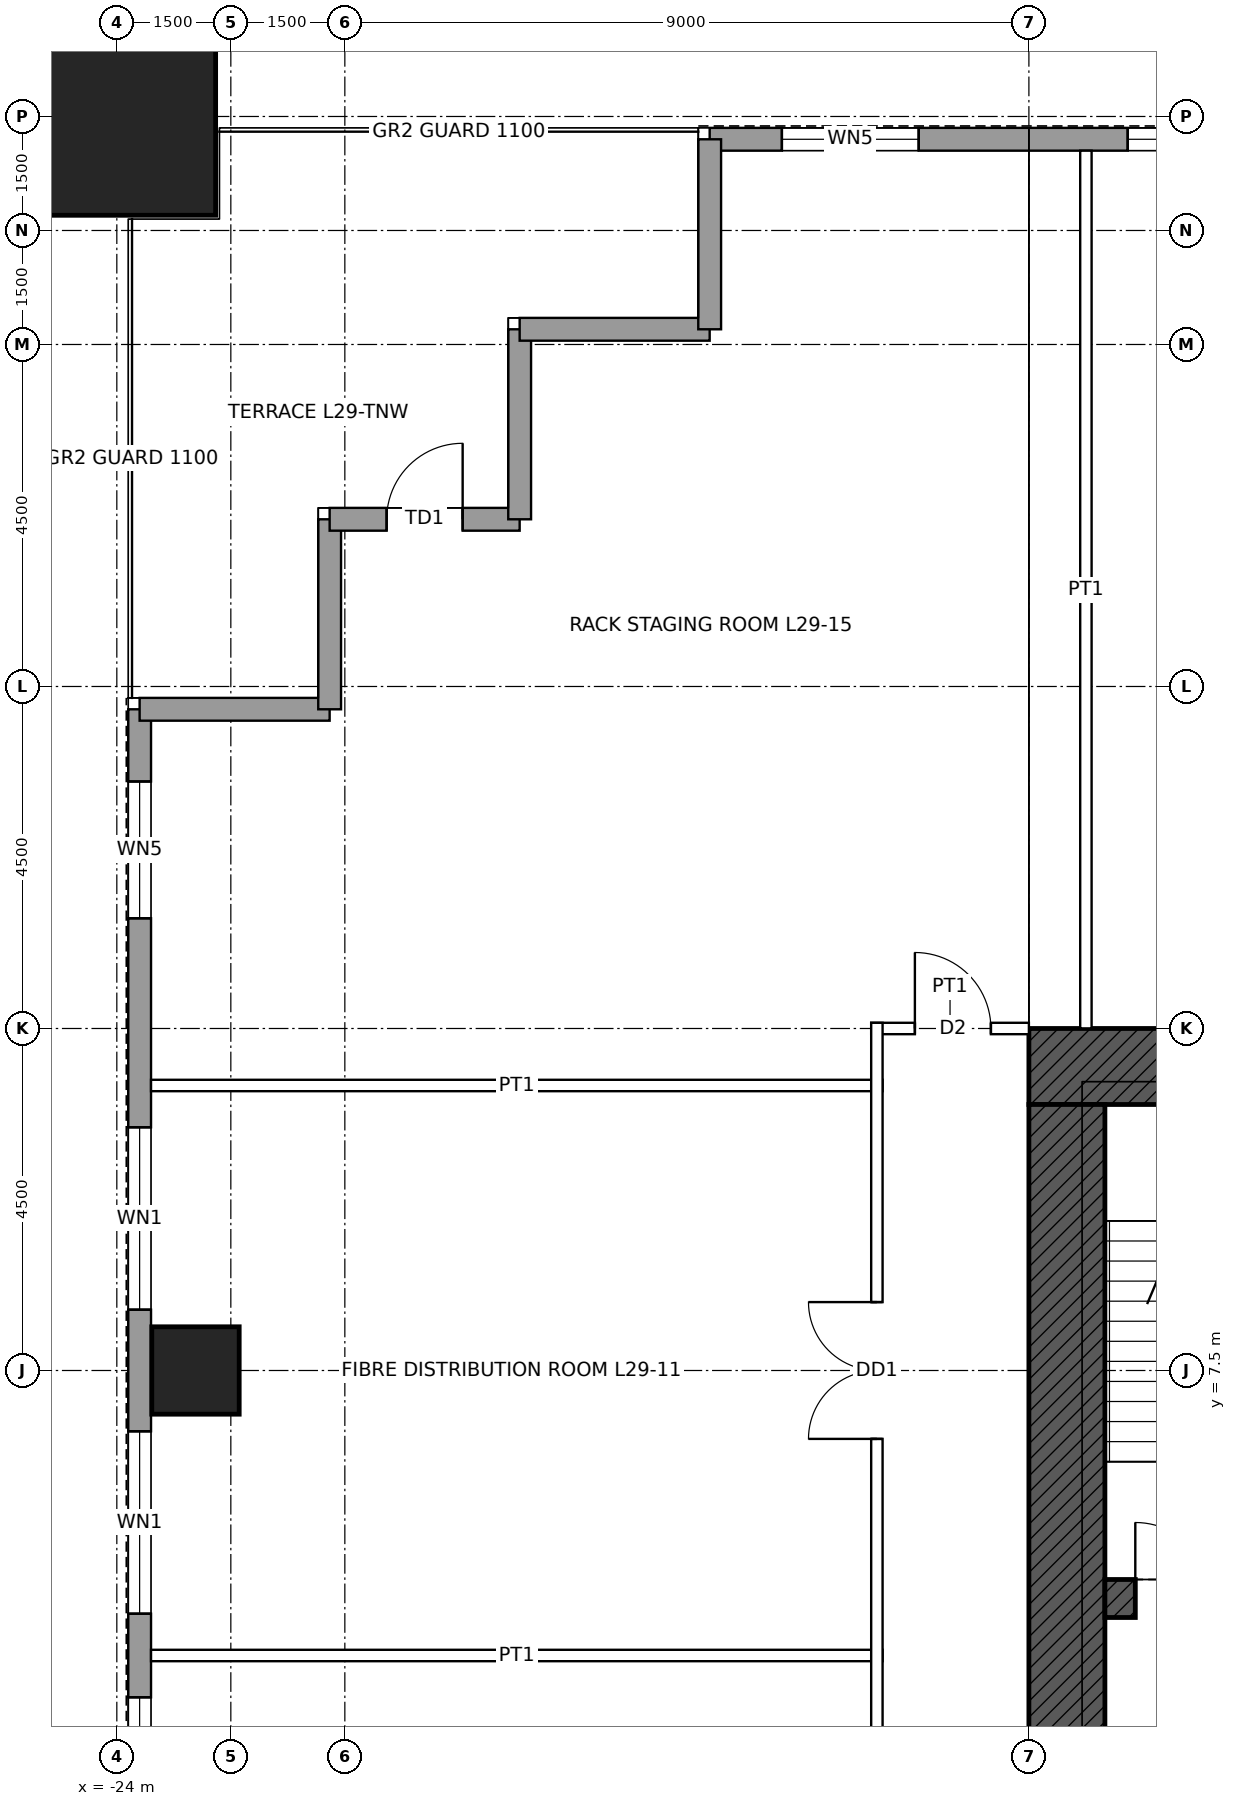
"""IFC4 building model, lengths in metres.
Left out: names, types, materials, properties, quantities, classifications, styles, units other than length and angle.
Written with IfcOpenShell. Run it as: python <this file> out.ifc"""

import sys

from ifc_helpers import new_model, si_unit, direction, frame, frame_2d, origin, origin_2d, place, context, subcontext, project, spatial, rectangle, hollow_rectangle, extrude, element, fill, save


model = new_model("IFC4")
c1 = context("Model", 3, precision=1e-05, world=origin(), true_north=direction((0.0, 1.0)))
c2 = subcontext(c1, "Body", "Model", "MODEL_VIEW")
j1 = project(units=[si_unit("LENGTHUNIT", "METRE"), si_unit("PLANEANGLEUNIT", "RADIAN")], contexts=[c1])
p1 = place(None, origin())
s1 = spatial("IfcSite", under=j1, at=p1, CompositionType="ELEMENT")
p2 = place(p1, origin())
s2 = spatial("IfcBuilding", under=s1, at=p2, CompositionType="ELEMENT")
p3 = place(p2, frame((0.0, 0.0, 144.9)))
s3 = spatial("IfcBuildingStorey", under=s2, at=p3, CompositionType="ELEMENT", Elevation=144.9)
p4 = place(p3, frame((-24.0, 24.0, 0.0), z_axis=(0.0, 0.0, 1.0), x_axis=(1.0, 0.0, 0.0)))
e1 = element("IfcColumn", 1, at=p4, inside=s3, PredefinedType="COLUMN", context=c2, shape_type="SweptSolid", body=[
    extrude(hollow_rectangle(XDim=2.6, YDim=2.6, WallThickness=0.13, at=origin_2d()), origin(), (0.0, 0.0, 1.0), 4.5),
])
p5 = place(p3, frame((-22.965, 7.5, 0.0), z_axis=(0.0, 0.0, 1.0), x_axis=(1.0, 0.0, 0.0)))
e2 = element("IfcColumn", 2, at=p5, inside=s3, PredefinedType="COLUMN", context=c2, shape_type="SweptSolid", body=[
    extrude(hollow_rectangle(XDim=1.15, YDim=1.15, WallThickness=0.075, at=origin_2d()), origin(), (0.0, 0.0, 1.0), 4.5),
])
p6 = place(p3, frame((-12.0, 11.5, 0.0), z_axis=(0.0, 0.0, 1.0), x_axis=(1.0, 0.0, 0.0)))
e3 = element("IfcWall", 3, at=p6, inside=s3, PredefinedType="SHEAR", context=c2, shape_type="SweptSolid", body=[
    extrude(rectangle(XDim=24.0, YDim=1.0, at=frame_2d((12.0, 0.0))), origin(), (0.0, 0.0, 1.0), 4.5),
])
p7 = place(p6, frame((6.25, 0.0, 0.0)))
e4 = element("IfcOpeningElement", 4, at=p7, cuts=e3, PredefinedType="OPENING", context=c2, shape_type="SweptSolid", body=[
    extrude(rectangle(XDim=1.0, YDim=2.4, at=frame_2d((0.5, 1.2))), frame((0.0, 0.51, 0.0), z_axis=(0.0, -1.0, 0.0), x_axis=(1.0, 0.0, 0.0)), (0.0, 0.0, 1.0), 1.02),
])
p8 = place(p6, frame((16.75, 0.0, 0.0)))
e5 = element("IfcOpeningElement", 5, at=p8, cuts=e3, PredefinedType="OPENING", context=c2, shape_type="SweptSolid", body=[
    extrude(rectangle(XDim=1.0, YDim=2.4, at=frame_2d((0.5, 1.2))), frame((0.0, 0.51, 0.0), z_axis=(0.0, -1.0, 0.0), x_axis=(1.0, 0.0, 0.0)), (0.0, 0.0, 1.0), 1.02),
])
p9 = place(p3, frame((-11.5, -11.0, 0.0), z_axis=(0.0, 0.0, 1.0), x_axis=(0.0, 1.0, 0.0)))
e6 = element("IfcWall", 6, at=p9, inside=s3, PredefinedType="SHEAR", context=c2, shape_type="SweptSolid", body=[
    extrude(rectangle(XDim=22.0, YDim=1.0, at=frame_2d((11.0, 0.0))), origin(), (0.0, 0.0, 1.0), 4.5),
])
p10 = place(p9, frame((10.5, 0.0, 0.0)))
e7 = element("IfcOpeningElement", 7, at=p10, cuts=e6, PredefinedType="OPENING", context=c2, shape_type="SweptSolid", body=[
    extrude(rectangle(XDim=1.0, YDim=2.4, at=frame_2d((0.5, 1.2))), frame((0.0, 0.51, 0.0), z_axis=(0.0, -1.0, 0.0), x_axis=(1.0, 0.0, 0.0)), (0.0, 0.0, 1.0), 1.02),
])
p11 = place(p3, frame((-11.0, 4.5, 0.0), z_axis=(0.0, 0.0, 1.0), x_axis=(1.0, 0.0, 0.0)))
e8 = element("IfcWall", 8, at=p11, inside=s3, PredefinedType="SHEAR", context=c2, shape_type="SweptSolid", body=[
    extrude(rectangle(XDim=22.0, YDim=0.5, at=frame_2d((11.0, 0.0))), origin(), (0.0, 0.0, 1.0), 4.5),
])
p12 = place(p11, frame((0.4, 0.0, 0.0)))
e9 = element("IfcOpeningElement", 9, at=p12, cuts=e8, PredefinedType="OPENING", context=c2, shape_type="SweptSolid", body=[
    extrude(rectangle(XDim=1.0, YDim=2.1, at=frame_2d((0.5, 1.05))), frame((0.0, 0.26, 0.0), z_axis=(0.0, -1.0, 0.0), x_axis=(1.0, 0.0, 0.0)), (0.0, 0.0, 1.0), 0.52),
])
p13 = place(p11, frame((20.6, 0.0, 0.0)))
e10 = element("IfcOpeningElement", 10, at=p13, cuts=e8, PredefinedType="OPENING", context=c2, shape_type="SweptSolid", body=[
    extrude(rectangle(XDim=1.0, YDim=2.1, at=frame_2d((0.5, 1.05))), frame((0.0, 0.26, 0.0), z_axis=(0.0, -1.0, 0.0), x_axis=(1.0, 0.0, 0.0)), (0.0, 0.0, 1.0), 0.52),
])
p14 = place(p3, frame((-16.2, 23.7, 0.0), z_axis=(0.0, 0.0, 1.0), x_axis=(1.0, 0.0, 0.0)))
e11 = element("IfcWall", 11, at=p14, inside=s3, PredefinedType="SOLIDWALL", context=c2, shape_type="SweptSolid", body=[
    extrude(rectangle(XDim=32.4, YDim=0.3, at=frame_2d((16.2, 0.0))), origin(), (0.0, 0.0, 1.0), 4.3),
])
p15 = place(p14, frame((0.95, 0.0, 1.0)))
e12 = element("IfcOpeningElement", 12, at=p15, cuts=e11, PredefinedType="OPENING", context=c2, shape_type="SweptSolid", body=[
    extrude(rectangle(XDim=1.8, YDim=1.2, at=frame_2d((0.9, 0.6))), frame((0.0, 0.16, 0.0), z_axis=(0.0, -1.0, 0.0), x_axis=(1.0, 0.0, 0.0)), (0.0, 0.0, 1.0), 0.32),
])
p16 = place(p14, frame((5.5, 0.0, 1.0)))
e13 = element("IfcOpeningElement", 13, at=p16, cuts=e11, PredefinedType="OPENING", context=c2, shape_type="SweptSolid", body=[
    extrude(rectangle(XDim=2.4, YDim=1.2, at=frame_2d((1.2, 0.6))), frame((0.0, 0.16, 0.0), z_axis=(0.0, -1.0, 0.0), x_axis=(1.0, 0.0, 0.0)), (0.0, 0.0, 1.0), 0.32),
])
p17 = place(p14, frame((9.5, 0.0, 1.0)))
e14 = element("IfcOpeningElement", 14, at=p17, cuts=e11, PredefinedType="OPENING", context=c2, shape_type="SweptSolid", body=[
    extrude(rectangle(XDim=2.4, YDim=1.2, at=frame_2d((1.2, 0.6))), frame((0.0, 0.16, 0.0), z_axis=(0.0, -1.0, 0.0), x_axis=(1.0, 0.0, 0.0)), (0.0, 0.0, 1.0), 0.32),
])
p18 = place(p14, frame((13.0, 0.0, 1.0)))
e15 = element("IfcOpeningElement", 15, at=p18, cuts=e11, PredefinedType="OPENING", context=c2, shape_type="SweptSolid", body=[
    extrude(rectangle(XDim=2.4, YDim=1.2, at=frame_2d((1.2, 0.6))), frame((0.0, 0.16, 0.0), z_axis=(0.0, -1.0, 0.0), x_axis=(1.0, 0.0, 0.0)), (0.0, 0.0, 1.0), 0.32),
])
p19 = place(p14, frame((17.0, 0.0, 1.0)))
e16 = element("IfcOpeningElement", 16, at=p19, cuts=e11, PredefinedType="OPENING", context=c2, shape_type="SweptSolid", body=[
    extrude(rectangle(XDim=2.4, YDim=1.2, at=frame_2d((1.2, 0.6))), frame((0.0, 0.16, 0.0), z_axis=(0.0, -1.0, 0.0), x_axis=(1.0, 0.0, 0.0)), (0.0, 0.0, 1.0), 0.32),
])
p20 = place(p14, frame((20.5, 0.0, 1.0)))
e17 = element("IfcOpeningElement", 17, at=p20, cuts=e11, PredefinedType="OPENING", context=c2, shape_type="SweptSolid", body=[
    extrude(rectangle(XDim=2.4, YDim=1.2, at=frame_2d((1.2, 0.6))), frame((0.0, 0.16, 0.0), z_axis=(0.0, -1.0, 0.0), x_axis=(1.0, 0.0, 0.0)), (0.0, 0.0, 1.0), 0.32),
])
p21 = place(p14, frame((24.5, 0.0, 1.0)))
e18 = element("IfcOpeningElement", 18, at=p21, cuts=e11, PredefinedType="OPENING", context=c2, shape_type="SweptSolid", body=[
    extrude(rectangle(XDim=2.4, YDim=1.2, at=frame_2d((1.2, 0.6))), frame((0.0, 0.16, 0.0), z_axis=(0.0, -1.0, 0.0), x_axis=(1.0, 0.0, 0.0)), (0.0, 0.0, 1.0), 0.32),
])
p22 = place(p14, frame((29.65, 0.0, 1.0)))
e19 = element("IfcOpeningElement", 19, at=p22, cuts=e11, PredefinedType="OPENING", context=c2, shape_type="SweptSolid", body=[
    extrude(rectangle(XDim=1.8, YDim=1.2, at=frame_2d((0.9, 0.6))), frame((0.0, 0.16, 0.0), z_axis=(0.0, -1.0, 0.0), x_axis=(1.0, 0.0, 0.0)), (0.0, 0.0, 1.0), 0.32),
])
p23 = place(p3, frame((-23.7, -16.2, 0.0), z_axis=(0.0, 0.0, 1.0), x_axis=(0.0, 1.0, 0.0)))
e20 = element("IfcWall", 20, at=p23, inside=s3, PredefinedType="SOLIDWALL", context=c2, shape_type="SweptSolid", body=[
    extrude(rectangle(XDim=32.4, YDim=0.3, at=frame_2d((16.2, 0.0))), origin(), (0.0, 0.0, 1.0), 4.3),
])
p24 = place(p23, frame((0.95, 0.0, 1.0)))
e21 = element("IfcOpeningElement", 21, at=p24, cuts=e20, PredefinedType="OPENING", context=c2, shape_type="SweptSolid", body=[
    extrude(rectangle(XDim=1.8, YDim=1.2, at=frame_2d((0.9, 0.6))), frame((0.0, 0.16, 0.0), z_axis=(0.0, -1.0, 0.0), x_axis=(1.0, 0.0, 0.0)), (0.0, 0.0, 1.0), 0.32),
])
p25 = place(p23, frame((5.5, 0.0, 1.0)))
e22 = element("IfcOpeningElement", 22, at=p25, cuts=e20, PredefinedType="OPENING", context=c2, shape_type="SweptSolid", body=[
    extrude(rectangle(XDim=2.4, YDim=1.2, at=frame_2d((1.2, 0.6))), frame((0.0, 0.16, 0.0), z_axis=(0.0, -1.0, 0.0), x_axis=(1.0, 0.0, 0.0)), (0.0, 0.0, 1.0), 0.32),
])
p26 = place(p23, frame((9.5, 0.0, 1.0)))
e23 = element("IfcOpeningElement", 23, at=p26, cuts=e20, PredefinedType="OPENING", context=c2, shape_type="SweptSolid", body=[
    extrude(rectangle(XDim=2.4, YDim=1.2, at=frame_2d((1.2, 0.6))), frame((0.0, 0.16, 0.0), z_axis=(0.0, -1.0, 0.0), x_axis=(1.0, 0.0, 0.0)), (0.0, 0.0, 1.0), 0.32),
])
p27 = place(p23, frame((13.0, 0.0, 1.0)))
e24 = element("IfcOpeningElement", 24, at=p27, cuts=e20, PredefinedType="OPENING", context=c2, shape_type="SweptSolid", body=[
    extrude(rectangle(XDim=2.4, YDim=1.2, at=frame_2d((1.2, 0.6))), frame((0.0, 0.16, 0.0), z_axis=(0.0, -1.0, 0.0), x_axis=(1.0, 0.0, 0.0)), (0.0, 0.0, 1.0), 0.32),
])
p28 = place(p23, frame((17.0, 0.0, 1.0)))
e25 = element("IfcOpeningElement", 25, at=p28, cuts=e20, PredefinedType="OPENING", context=c2, shape_type="SweptSolid", body=[
    extrude(rectangle(XDim=2.4, YDim=1.2, at=frame_2d((1.2, 0.6))), frame((0.0, 0.16, 0.0), z_axis=(0.0, -1.0, 0.0), x_axis=(1.0, 0.0, 0.0)), (0.0, 0.0, 1.0), 0.32),
])
p29 = place(p23, frame((20.5, 0.0, 1.0)))
e26 = element("IfcOpeningElement", 26, at=p29, cuts=e20, PredefinedType="OPENING", context=c2, shape_type="SweptSolid", body=[
    extrude(rectangle(XDim=2.4, YDim=1.2, at=frame_2d((1.2, 0.6))), frame((0.0, 0.16, 0.0), z_axis=(0.0, -1.0, 0.0), x_axis=(1.0, 0.0, 0.0)), (0.0, 0.0, 1.0), 0.32),
])
p30 = place(p23, frame((24.5, 0.0, 1.0)))
e27 = element("IfcOpeningElement", 27, at=p30, cuts=e20, PredefinedType="OPENING", context=c2, shape_type="SweptSolid", body=[
    extrude(rectangle(XDim=2.4, YDim=1.2, at=frame_2d((1.2, 0.6))), frame((0.0, 0.16, 0.0), z_axis=(0.0, -1.0, 0.0), x_axis=(1.0, 0.0, 0.0)), (0.0, 0.0, 1.0), 0.32),
])
p31 = place(p23, frame((29.65, 0.0, 1.0)))
e28 = element("IfcOpeningElement", 28, at=p31, cuts=e20, PredefinedType="OPENING", context=c2, shape_type="SweptSolid", body=[
    extrude(rectangle(XDim=1.8, YDim=1.2, at=frame_2d((0.9, 0.6))), frame((0.0, 0.16, 0.0), z_axis=(0.0, -1.0, 0.0), x_axis=(1.0, 0.0, 0.0)), (0.0, 0.0, 1.0), 0.32),
])
for number, where, z_axis, x_axis in (
    (29, (-23.7, 16.2, 0.0), (0.0, 0.0, 1.0), (1.0, 0.0, 0.0)),
    (30, (-21.2, 16.2, 0.0), (0.0, 0.0, 1.0), (0.0, 1.0, 0.0)),
):
    element("IfcWall", number, at=place(p3, frame(where, z_axis=z_axis, x_axis=x_axis)), inside=s3, PredefinedType="SOLIDWALL", context=c2, shape_type="SweptSolid", body=[
        extrude(rectangle(XDim=2.5, YDim=0.3, at=frame_2d((1.25, 0.0))), origin(), (0.0, 0.0, 1.0), 4.3),
    ])
p32 = place(p3, frame((-21.2, 18.7, 0.0), z_axis=(0.0, 0.0, 1.0), x_axis=(1.0, 0.0, 0.0)))
e31 = element("IfcWall", 31, at=p32, inside=s3, PredefinedType="SOLIDWALL", context=c2, shape_type="SweptSolid", body=[
    extrude(rectangle(XDim=2.5, YDim=0.3, at=frame_2d((1.25, 0.0))), origin(), (0.0, 0.0, 1.0), 4.3),
])
p33 = place(p32, frame((0.75, 0.0, 0.0)))
e32 = element("IfcOpeningElement", 32, at=p33, cuts=e31, PredefinedType="OPENING", context=c2, shape_type="SweptSolid", body=[
    extrude(rectangle(XDim=1.0, YDim=2.4, at=frame_2d((0.5, 1.2))), frame((0.0, 0.16, 0.0), z_axis=(0.0, -1.0, 0.0), x_axis=(1.0, 0.0, 0.0)), (0.0, 0.0, 1.0), 0.32),
])
for number, where, z_axis, x_axis in (
    (33, (-18.7, 18.7, 0.0), (0.0, 0.0, 1.0), (0.0, 1.0, 0.0)),
    (34, (-18.7, 21.2, 0.0), (0.0, 0.0, 1.0), (1.0, 0.0, 0.0)),
    (35, (-16.2, 21.2, 0.0), (0.0, 0.0, 1.0), (0.0, 1.0, 0.0)),
):
    element("IfcWall", number, at=place(p3, frame(where, z_axis=z_axis, x_axis=x_axis)), inside=s3, PredefinedType="SOLIDWALL", context=c2, shape_type="SweptSolid", body=[
        extrude(rectangle(XDim=2.5, YDim=0.3, at=frame_2d((1.25, 0.0))), origin(), (0.0, 0.0, 1.0), 4.3),
    ])
for number, where, z_axis, x_axis in (
    (36, (-23.55, 3.75, 0.0), (0.0, 0.0, 1.0), (1.0, 0.0, 0.0)),
    (37, (-23.55, 11.25, 0.0), (0.0, 0.0, 1.0), (1.0, 0.0, 0.0)),
):
    element("IfcWall", number, at=place(p3, frame(where, z_axis=z_axis, x_axis=x_axis)), inside=s3, PredefinedType="PARTITIONING", context=c2, shape_type="SweptSolid", body=[
        extrude(rectangle(XDim=9.625, YDim=0.15, at=frame_2d((4.812, 0.0))), origin(), (0.0, 0.0, 1.0), 3.431),
    ])
p34 = place(p3, frame((-14.075, 12.0, 0.0), z_axis=(0.0, 0.0, 1.0), x_axis=(1.0, 0.0, 0.0)))
e38 = element("IfcWall", 38, at=p34, inside=s3, PredefinedType="PARTITIONING", context=c2, shape_type="SweptSolid", body=[
    extrude(rectangle(XDim=2.075, YDim=0.15, at=frame_2d((1.038, 0.0))), origin(), (0.0, 0.0, 1.0), 4.3),
])
p35 = place(p34, frame((0.575, 0.0, 0.0)))
e39 = element("IfcOpeningElement", 39, at=p35, cuts=e38, PredefinedType="OPENING", context=c2, shape_type="SweptSolid", body=[
    extrude(rectangle(XDim=1.0, YDim=2.1, at=frame_2d((0.5, 1.05))), frame((0.0, 0.085, 0.0), z_axis=(0.0, -1.0, 0.0), x_axis=(1.0, 0.0, 0.0)), (0.0, 0.0, 1.0), 0.17),
])
p36 = place(p3, frame((-14.0, -14.075, 0.0), z_axis=(0.0, 0.0, 1.0), x_axis=(0.0, 1.0, 0.0)))
e40 = element("IfcWall", 40, at=p36, inside=s3, PredefinedType="PARTITIONING", context=c2, shape_type="SweptSolid", body=[
    extrude(rectangle(XDim=26.15, YDim=0.15, at=frame_2d((13.075, 0.0))), origin(), (0.0, 0.0, 1.0), 4.3),
])
p37 = place(p36, frame((5.675, 0.0, 0.0)))
e41 = element("IfcOpeningElement", 41, at=p37, cuts=e40, PredefinedType="OPENING", context=c2, shape_type="SweptSolid", body=[
    extrude(rectangle(XDim=1.8, YDim=2.4, at=frame_2d((0.9, 1.2))), frame((0.0, 0.085, 0.0), z_axis=(0.0, -1.0, 0.0), x_axis=(1.0, 0.0, 0.0)), (0.0, 0.0, 1.0), 0.17),
])
p38 = place(p36, frame((13.175, 0.0, 0.0)))
e42 = element("IfcOpeningElement", 42, at=p38, cuts=e40, PredefinedType="OPENING", context=c2, shape_type="SweptSolid", body=[
    extrude(rectangle(XDim=1.8, YDim=2.4, at=frame_2d((0.9, 1.2))), frame((0.0, 0.085, 0.0), z_axis=(0.0, -1.0, 0.0), x_axis=(1.0, 0.0, 0.0)), (0.0, 0.0, 1.0), 0.17),
])
p39 = place(p36, frame((20.675, 0.0, 0.0)))
e43 = element("IfcOpeningElement", 43, at=p39, cuts=e40, PredefinedType="OPENING", context=c2, shape_type="SweptSolid", body=[
    extrude(rectangle(XDim=1.8, YDim=2.4, at=frame_2d((0.9, 1.2))), frame((0.0, 0.085, 0.0), z_axis=(0.0, -1.0, 0.0), x_axis=(1.0, 0.0, 0.0)), (0.0, 0.0, 1.0), 0.17),
])
p40 = place(p3, frame((-11.25, 12.0, 0.0), z_axis=(0.0, 0.0, 1.0), x_axis=(0.0, 1.0, 0.0)))
e44 = element("IfcWall", 44, at=p40, inside=s3, PredefinedType="PARTITIONING", context=c2, shape_type="SweptSolid", body=[
    extrude(rectangle(XDim=11.55, YDim=0.15, at=frame_2d((5.775, 0.0))), origin(), (0.0, 0.0, 1.0), 3.431),
])
p41 = place(p15, origin())
e45 = element("IfcWindow", 45, at=p41, inside=s3, PartitioningType="SINGLE_PANEL", PredefinedType="WINDOW", context=c2, shape_type="SweptSolid", body=[
    extrude(rectangle(XDim=1.8, YDim=1.2, at=frame_2d((0.9, 0.6))), frame((0.0, 0.03, 0.0), z_axis=(0.0, -1.0, 0.0), x_axis=(1.0, 0.0, 0.0)), (0.0, 0.0, 1.0), 0.06),
])
fill(e12, e45)
p42 = place(p16, origin())
e46 = element("IfcWindow", 46, at=p42, inside=s3, PartitioningType="SINGLE_PANEL", PredefinedType="WINDOW", context=c2, shape_type="SweptSolid", body=[
    extrude(rectangle(XDim=2.4, YDim=1.2, at=frame_2d((1.2, 0.6))), frame((0.0, 0.03, 0.0), z_axis=(0.0, -1.0, 0.0), x_axis=(1.0, 0.0, 0.0)), (0.0, 0.0, 1.0), 0.06),
])
fill(e13, e46)
p43 = place(p28, origin())
e47 = element("IfcWindow", 47, at=p43, inside=s3, PartitioningType="SINGLE_PANEL", PredefinedType="WINDOW", context=c2, shape_type="SweptSolid", body=[
    extrude(rectangle(XDim=2.4, YDim=1.2, at=frame_2d((1.2, 0.6))), frame((0.0, 0.03, 0.0), z_axis=(0.0, -1.0, 0.0), x_axis=(1.0, 0.0, 0.0)), (0.0, 0.0, 1.0), 0.06),
])
fill(e25, e47)
p44 = place(p29, origin())
e48 = element("IfcWindow", 48, at=p44, inside=s3, PartitioningType="SINGLE_PANEL", PredefinedType="WINDOW", context=c2, shape_type="SweptSolid", body=[
    extrude(rectangle(XDim=2.4, YDim=1.2, at=frame_2d((1.2, 0.6))), frame((0.0, 0.03, 0.0), z_axis=(0.0, -1.0, 0.0), x_axis=(1.0, 0.0, 0.0)), (0.0, 0.0, 1.0), 0.06),
])
fill(e26, e48)
p45 = place(p30, origin())
e49 = element("IfcWindow", 49, at=p45, inside=s3, PartitioningType="SINGLE_PANEL", PredefinedType="WINDOW", context=c2, shape_type="SweptSolid", body=[
    extrude(rectangle(XDim=2.4, YDim=1.2, at=frame_2d((1.2, 0.6))), frame((0.0, 0.03, 0.0), z_axis=(0.0, -1.0, 0.0), x_axis=(1.0, 0.0, 0.0)), (0.0, 0.0, 1.0), 0.06),
])
fill(e27, e49)
p46 = place(p31, origin())
e50 = element("IfcWindow", 50, at=p46, inside=s3, PartitioningType="SINGLE_PANEL", PredefinedType="WINDOW", context=c2, shape_type="SweptSolid", body=[
    extrude(rectangle(XDim=1.8, YDim=1.2, at=frame_2d((0.9, 0.6))), frame((0.0, 0.03, 0.0), z_axis=(0.0, -1.0, 0.0), x_axis=(1.0, 0.0, 0.0)), (0.0, 0.0, 1.0), 0.06),
])
fill(e28, e50)
p47 = place(p33, origin())
e51 = element("IfcDoor", 51, at=p47, inside=s3, OperationType="SINGLE_SWING_RIGHT", PredefinedType="DOOR", context=c2, shape_type="SweptSolid", body=[
    extrude(rectangle(XDim=1.0, YDim=2.4, at=frame_2d((0.5, 1.2))), frame((0.0, 0.025, 0.0), z_axis=(0.0, -1.0, 0.0), x_axis=(1.0, 0.0, 0.0)), (0.0, 0.0, 1.0), 0.05),
])
fill(e32, e51)
p48 = place(p12, origin())
e52 = element("IfcDoor", 52, at=p48, inside=s3, OperationType="SINGLE_SWING_LEFT", PredefinedType="DOOR", context=c2, shape_type="SweptSolid", body=[
    extrude(rectangle(XDim=1.0, YDim=2.1, at=frame_2d((0.5, 1.05))), frame((0.0, 0.025, 0.0), z_axis=(0.0, -1.0, 0.0), x_axis=(1.0, 0.0, 0.0)), (0.0, 0.0, 1.0), 0.05),
])
fill(e9, e52)
p49 = place(p39, origin())
e53 = element("IfcDoor", 53, at=p49, inside=s3, OperationType="DOUBLE_DOOR_SINGLE_SWING", PredefinedType="DOOR", context=c2, shape_type="SweptSolid", body=[
    extrude(rectangle(XDim=1.8, YDim=2.4, at=frame_2d((0.9, 1.2))), frame((0.0, 0.025, 0.0), z_axis=(0.0, -1.0, 0.0), x_axis=(1.0, 0.0, 0.0)), (0.0, 0.0, 1.0), 0.05),
])
fill(e43, e53)
p50 = place(p35, origin())
e54 = element("IfcDoor", 54, at=p50, inside=s3, OperationType="SINGLE_SWING_LEFT", PredefinedType="DOOR", context=c2, shape_type="SweptSolid", body=[
    extrude(rectangle(XDim=1.0, YDim=2.1, at=frame_2d((0.5, 1.05))), frame((0.0, 0.025, 0.0), z_axis=(0.0, -1.0, 0.0), x_axis=(1.0, 0.0, 0.0)), (0.0, 0.0, 1.0), 0.05),
])
fill(e39, e54)
save(model, sys.argv[1])
